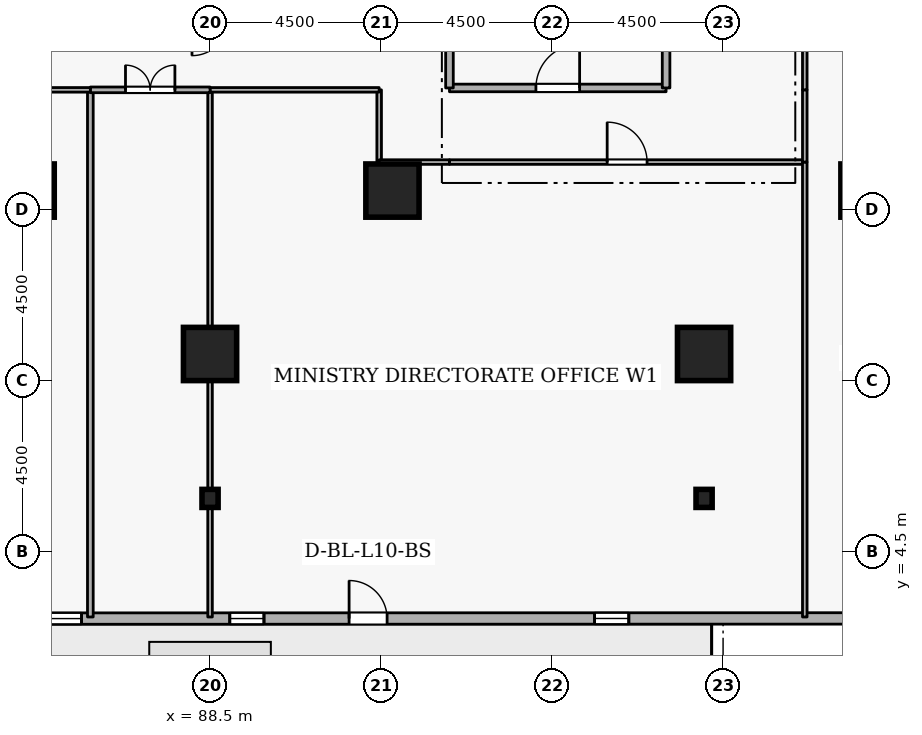
"""IFC4 building model, lengths in metres.
Left out: names, types, materials, properties, quantities, classifications, styles, units other than length and angle.
Written with IfcOpenShell. Run it as: python <this file> out.ifc"""

import sys

from ifc_helpers import new_model, si_unit, direction, frame, frame_2d, origin, origin_2d, place, context, subcontext, project, spatial, rectangle, i_section, extrude, element, fill, save


model = new_model("IFC4")
c1 = context("Model", 3, precision=1e-05, world=origin(), true_north=direction((0.0, 1.0)))
c2 = subcontext(c1, "Body", "Model", "MODEL_VIEW")
j1 = project(units=[si_unit("LENGTHUNIT", "METRE"), si_unit("PLANEANGLEUNIT", "RADIAN")], contexts=[c1])
p1 = place(None, origin())
s1 = spatial("IfcSite", under=j1, at=p1, CompositionType="ELEMENT")
p2 = place(p1, origin())
s2 = spatial("IfcBuilding", under=s1, at=p2, CompositionType="ELEMENT")
p3 = place(p2, frame((0.0, 0.0, 42.3)))
s3 = spatial("IfcBuildingStorey", under=s2, at=p3, CompositionType="ELEMENT", Elevation=42.3)
for number, where, z_axis, x_axis in (
    (1, (105.8, 14.0, 0.0), (0.0, 0.0, 1.0), (1.0, 0.0, 0.0)),
    (2, (101.5, 9.7, 0.0), (0.0, 0.0, 1.0), (1.0, 0.0, 0.0)),
    (3, (88.5, 9.7, 0.0), (0.0, 0.0, 1.0), (1.0, 0.0, 0.0)),
    (4, (93.3, 14.0, 0.0), (0.0, 0.0, 1.0), (1.0, 0.0, 0.0)),
    (5, (83.7, 14.0, 0.0), (0.0, 0.0, 1.0), (1.0, 0.0, 0.0)),
):
    element("IfcColumn", number, at=place(p3, frame(where, z_axis=z_axis, x_axis=x_axis)), inside=s3, PredefinedType="COLUMN", context=c2, shape_type="SweptSolid", body=[
        extrude(rectangle(XDim=1.4, YDim=1.4, at=origin_2d()), origin(), (0.0, 0.0, 1.0), 3.6),
    ])
for number, where, z_axis, x_axis in (
    (6, (101.5, 5.9, 0.0), (0.0, 0.0, 1.0), (1.0, 0.0, 0.0)),
    (7, (88.5, 5.9, 0.0), (0.0, 0.0, 1.0), (1.0, 0.0, 0.0)),
):
    element("IfcColumn", number, at=place(p3, frame(where, z_axis=z_axis, x_axis=x_axis)), inside=s3, PredefinedType="COLUMN", context=c2, shape_type="SweptSolid", body=[
        extrude(i_section(OverallWidth=0.424, OverallDepth=0.475, WebThickness=0.048, FlangeThickness=0.077, FilletRadius=0.015, at=origin_2d()), origin(), (0.0, 0.0, 1.0), 3.6),
    ])
p4 = place(p3, frame((72.819, 2.735, 0.0), z_axis=(0.0, 0.0, 1.0), x_axis=(0.999999978205, 0.000208784245, 0.0)))
e8 = element("IfcWall", 8, at=p4, inside=s3, PredefinedType="STANDARD", context=c2, shape_type="SweptSolid", body=[
    extrude(rectangle(XDim=35.08, YDim=0.3, at=frame_2d((17.54, 0.0))), origin(), (0.0, 0.0, 1.0), 2.7),
])
p5 = place(p4, frame((19.34, 0.0, 0.0)))
e9 = element("IfcOpeningElement", 9, at=p5, cuts=e8, PredefinedType="OPENING", context=c2, shape_type="SweptSolid", body=[
    extrude(rectangle(XDim=1.0, YDim=2.08, at=frame_2d((0.5, 1.04))), frame((0.0, 0.16, 0.0), z_axis=(0.0, -1.0, 0.0), x_axis=(1.0, 0.0, 0.0)), (0.0, 0.0, 1.0), 0.32),
])
p6 = place(p4, frame((1.8, 0.0, 0.72)))
e10 = element("IfcOpeningElement", 10, at=p6, cuts=e8, PredefinedType="OPENING", context=c2, shape_type="SweptSolid", body=[
    extrude(rectangle(XDim=0.9, YDim=1.75, at=frame_2d((0.45, 0.875))), frame((0.0, 0.16, 0.0), z_axis=(0.0, -1.0, 0.0), x_axis=(1.0, 0.0, 0.0)), (0.0, 0.0, 1.0), 0.32),
])
p7 = place(p4, frame((6.6, 0.0, 0.72)))
e11 = element("IfcOpeningElement", 11, at=p7, cuts=e8, PredefinedType="OPENING", context=c2, shape_type="SweptSolid", body=[
    extrude(rectangle(XDim=0.9, YDim=1.75, at=frame_2d((0.45, 0.875))), frame((0.0, 0.16, 0.0), z_axis=(0.0, -1.0, 0.0), x_axis=(1.0, 0.0, 0.0)), (0.0, 0.0, 1.0), 0.32),
])
p8 = place(p4, frame((11.4, 0.0, 0.72)))
e12 = element("IfcOpeningElement", 12, at=p8, cuts=e8, PredefinedType="OPENING", context=c2, shape_type="SweptSolid", body=[
    extrude(rectangle(XDim=0.9, YDim=1.75, at=frame_2d((0.45, 0.875))), frame((0.0, 0.16, 0.0), z_axis=(0.0, -1.0, 0.0), x_axis=(1.0, 0.0, 0.0)), (0.0, 0.0, 1.0), 0.32),
])
p9 = place(p4, frame((16.2, 0.0, 0.72)))
e13 = element("IfcOpeningElement", 13, at=p9, cuts=e8, PredefinedType="OPENING", context=c2, shape_type="SweptSolid", body=[
    extrude(rectangle(XDim=0.9, YDim=1.75, at=frame_2d((0.45, 0.875))), frame((0.0, 0.16, 0.0), z_axis=(0.0, -1.0, 0.0), x_axis=(1.0, 0.0, 0.0)), (0.0, 0.0, 1.0), 0.32),
])
p10 = place(p4, frame((25.8, 0.0, 0.72)))
e14 = element("IfcOpeningElement", 14, at=p10, cuts=e8, PredefinedType="OPENING", context=c2, shape_type="SweptSolid", body=[
    extrude(rectangle(XDim=0.9, YDim=1.75, at=frame_2d((0.45, 0.875))), frame((0.0, 0.16, 0.0), z_axis=(0.0, -1.0, 0.0), x_axis=(1.0, 0.0, 0.0)), (0.0, 0.0, 1.0), 0.32),
])
p11 = place(p3, frame((94.8, 16.7, 0.0), z_axis=(0.0, 0.0, 1.0), x_axis=(1.0, 0.0, 0.0)))
e15 = element("IfcWall", 15, at=p11, inside=s3, PredefinedType="STANDARD", context=c2, shape_type="SweptSolid", body=[
    extrude(rectangle(XDim=5.7, YDim=0.2, at=frame_2d((2.85, 0.0))), origin(), (0.0, 0.0, 1.0), 3.34),
])
p12 = place(p11, frame((2.275, 0.0, 0.0)))
e16 = element("IfcOpeningElement", 16, at=p12, cuts=e15, PredefinedType="OPENING", context=c2, shape_type="SweptSolid", body=[
    extrude(rectangle(XDim=1.15, YDim=2.1, at=frame_2d((0.575, 1.05))), frame((0.0, 0.11, 0.0), z_axis=(0.0, -1.0, 0.0), x_axis=(1.0, 0.0, 0.0)), (0.0, 0.0, 1.0), 0.22),
])
for number, where, z_axis, x_axis in (
    (17, (100.5, 16.7, 0.0), (0.0, 0.0, 1.0), (0.0, 1.0, 0.0)),
    (18, (94.8, 19.2, 0.0), (0.0, 0.0, 1.0), (0.0, -1.0, 0.0)),
):
    element("IfcWall", number, at=place(p3, frame(where, z_axis=z_axis, x_axis=x_axis)), inside=s3, PredefinedType="STANDARD", context=c2, shape_type="SweptSolid", body=[
        extrude(rectangle(XDim=2.5, YDim=0.2, at=frame_2d((1.25, 0.0))), origin(), (0.0, 0.0, 1.0), 3.34),
    ])
p13 = place(p3, frame((92.95, 16.65, 0.0), z_axis=(0.0, 0.0, 1.0), x_axis=(0.0, -1.0, 0.0)))
e19 = element("IfcWall", 19, at=p13, inside=s3, PredefinedType="PARTITIONING", context=c2, shape_type="SweptSolid", body=[
    extrude(rectangle(XDim=1.9, YDim=0.12, at=frame_2d((0.95, 0.0))), origin(), (0.0, 0.0, 1.0), 3.34),
])
p14 = place(p3, frame((92.95, 14.75, 0.0), z_axis=(0.0, 0.0, 1.0), x_axis=(1.0, 0.0, 0.0)))
e20 = element("IfcWall", 20, at=p14, inside=s3, PredefinedType="PARTITIONING", context=c2, shape_type="SweptSolid", body=[
    extrude(rectangle(XDim=1.85, YDim=0.12, at=frame_2d((0.925, 0.0))), origin(), (0.0, 0.0, 1.0), 3.34),
])
p15 = place(p3, frame((94.8, 14.75, 0.0), z_axis=(0.0, 0.0, 1.0), x_axis=(1.0, 0.0, 0.0)))
e21 = element("IfcWall", 21, at=p15, inside=s3, PredefinedType="PARTITIONING", context=c2, shape_type="SweptSolid", body=[
    extrude(rectangle(XDim=9.35, YDim=0.12, at=frame_2d((4.675, 0.0))), origin(), (0.0, 0.0, 1.0), 3.34),
])
p16 = place(p15, frame((4.15, 0.0, 0.0)))
e22 = element("IfcOpeningElement", 22, at=p16, cuts=e21, PredefinedType="OPENING", context=c2, shape_type="SweptSolid", body=[
    extrude(rectangle(XDim=1.05, YDim=2.1, at=frame_2d((0.525, 1.05))), frame((0.0, 0.07, 0.0), z_axis=(0.0, -1.0, 0.0), x_axis=(1.0, 0.0, 0.0)), (0.0, 0.0, 1.0), 0.14),
])
p17 = place(p3, frame((104.15, 14.75, 0.0), z_axis=(0.0, 0.0, 1.0), x_axis=(0.0, -1.0, 0.0)))
e23 = element("IfcWall", 23, at=p17, inside=s3, PredefinedType="PARTITIONING", context=c2, shape_type="SweptSolid", body=[
    extrude(rectangle(XDim=11.97, YDim=0.12, at=frame_2d((5.985, 0.0))), origin(), (0.0, 0.0, 1.0), 3.34),
])
p18 = place(p3, frame((88.5, 2.78, 0.0), z_axis=(0.0, 0.0, 1.0), x_axis=(0.0, 1.0, 0.0)))
e24 = element("IfcWall", 24, at=p18, inside=s3, PredefinedType="PARTITIONING", context=c2, shape_type="SweptSolid", body=[
    extrude(rectangle(XDim=13.87, YDim=0.12, at=frame_2d((6.935, 0.0))), origin(), (0.0, 0.0, 1.0), 2.882),
])
p19 = place(p3, frame((88.5, 16.65, 0.0), z_axis=(0.0, 0.0, 1.0), x_axis=(1.0, 0.0, 0.0)))
e25 = element("IfcWall", 25, at=p19, inside=s3, PredefinedType="PARTITIONING", context=c2, shape_type="SweptSolid", body=[
    extrude(rectangle(XDim=4.45, YDim=0.12, at=frame_2d((2.225, 0.0))), origin(), (0.0, 0.0, 1.0), 3.34),
])
p20 = place(p3, frame((85.35, 2.78, 0.0), z_axis=(0.0, 0.0, 1.0), x_axis=(0.0, 1.0, 0.0)))
e26 = element("IfcWall", 26, at=p20, inside=s3, PredefinedType="PARTITIONING", context=c2, shape_type="SweptSolid", body=[
    extrude(rectangle(XDim=13.87, YDim=0.15, at=frame_2d((6.935, 0.0))), origin(), (0.0, 0.0, 1.0), 3.34),
])
p21 = place(p3, frame((85.35, 16.65, 0.0), z_axis=(0.0, 0.0, 1.0), x_axis=(1.0, 0.0, 0.0)))
e27 = element("IfcWall", 27, at=p21, inside=s3, PredefinedType="PARTITIONING", context=c2, shape_type="SweptSolid", body=[
    extrude(rectangle(XDim=3.15, YDim=0.15, at=frame_2d((1.575, 0.0))), origin(), (0.0, 0.0, 1.0), 3.34),
])
p22 = place(p21, frame((0.925, 0.0, 0.0)))
e28 = element("IfcOpeningElement", 28, at=p22, cuts=e27, PredefinedType="OPENING", context=c2, shape_type="SweptSolid", body=[
    extrude(rectangle(XDim=1.3, YDim=2.12, at=frame_2d((0.65, 1.06))), frame((0.0, 0.085, 0.0), z_axis=(0.0, -1.0, 0.0), x_axis=(1.0, 0.0, 0.0)), (0.0, 0.0, 1.0), 0.17),
])
p23 = place(p3, frame((84.05, 16.65, 0.0), z_axis=(0.0, 0.0, 1.0), x_axis=(1.0, 0.0, 0.0)))
e29 = element("IfcWall", 29, at=p23, inside=s3, PredefinedType="PARTITIONING", context=c2, shape_type="SweptSolid", body=[
    extrude(rectangle(XDim=1.3, YDim=0.12, at=frame_2d((0.65, 0.0))), origin(), (0.0, 0.0, 1.0), 3.34),
])
p24 = place(p3, frame((104.15, 14.75, 0.0), z_axis=(0.0, 0.0, 1.0), x_axis=(0.0, 1.0, 0.0)))
e30 = element("IfcWall", 30, at=p24, inside=s3, PredefinedType="PARTITIONING", context=c2, shape_type="SweptSolid", body=[
    extrude(rectangle(XDim=1.9, YDim=0.12, at=frame_2d((0.95, 0.0))), origin(), (0.0, 0.0, 1.0), 3.34),
])
p25 = place(p3, frame((104.15, 16.65, 0.0), z_axis=(0.0, 0.0, 1.0), x_axis=(0.0, 1.0, 0.0)))
e31 = element("IfcWall", 31, at=p25, inside=s3, PredefinedType="PARTITIONING", context=c2, shape_type="SweptSolid", body=[
    extrude(rectangle(XDim=4.85, YDim=0.12, at=frame_2d((2.425, 0.0))), origin(), (0.0, 0.0, 1.0), 3.34),
])
p26 = place(p25, frame((1.9, 0.0, 0.0)))
e32 = element("IfcOpeningElement", 32, at=p26, cuts=e31, PredefinedType="OPENING", context=c2, shape_type="SweptSolid", body=[
    extrude(rectangle(XDim=1.05, YDim=2.1, at=frame_2d((0.525, 1.05))), frame((0.0, 0.07, 0.0), z_axis=(0.0, -1.0, 0.0), x_axis=(1.0, 0.0, 0.0)), (0.0, 0.0, 1.0), 0.14),
])
p27 = place(p5, origin())
e33 = element("IfcDoor", 33, at=p27, inside=s3, OperationType="SINGLE_SWING_LEFT", PredefinedType="DOOR", context=c2, shape_type="SweptSolid", body=[
    extrude(rectangle(XDim=1.0, YDim=2.08, at=frame_2d((0.5, 1.04))), frame((0.0, 0.025, 0.0), z_axis=(0.0, -1.0, 0.0), x_axis=(1.0, 0.0, 0.0)), (0.0, 0.0, 1.0), 0.05),
])
fill(e9, e33)
p28 = place(p8, origin())
e34 = element("IfcWindow", 34, at=p28, inside=s3, PartitioningType="SINGLE_PANEL", PredefinedType="WINDOW", context=c2, shape_type="SweptSolid", body=[
    extrude(rectangle(XDim=0.9, YDim=1.75, at=frame_2d((0.45, 0.875))), frame((0.0, 0.03, 0.0), z_axis=(0.0, -1.0, 0.0), x_axis=(1.0, 0.0, 0.0)), (0.0, 0.0, 1.0), 0.06),
])
fill(e12, e34)
p29 = place(p9, origin())
e35 = element("IfcWindow", 35, at=p29, inside=s3, PartitioningType="SINGLE_PANEL", PredefinedType="WINDOW", context=c2, shape_type="SweptSolid", body=[
    extrude(rectangle(XDim=0.9, YDim=1.75, at=frame_2d((0.45, 0.875))), frame((0.0, 0.03, 0.0), z_axis=(0.0, -1.0, 0.0), x_axis=(1.0, 0.0, 0.0)), (0.0, 0.0, 1.0), 0.06),
])
fill(e13, e35)
p30 = place(p10, origin())
e36 = element("IfcWindow", 36, at=p30, inside=s3, PartitioningType="SINGLE_PANEL", PredefinedType="WINDOW", context=c2, shape_type="SweptSolid", body=[
    extrude(rectangle(XDim=0.9, YDim=1.75, at=frame_2d((0.45, 0.875))), frame((0.0, 0.03, 0.0), z_axis=(0.0, -1.0, 0.0), x_axis=(1.0, 0.0, 0.0)), (0.0, 0.0, 1.0), 0.06),
])
fill(e14, e36)
p31 = place(p12, origin())
e37 = element("IfcDoor", 37, at=p31, inside=s3, OperationType="SINGLE_SWING_RIGHT", PredefinedType="DOOR", context=c2, shape_type="SweptSolid", body=[
    extrude(rectangle(XDim=1.15, YDim=2.1, at=frame_2d((0.575, 1.05))), frame((0.0, 0.025, 0.0), z_axis=(0.0, -1.0, 0.0), x_axis=(1.0, 0.0, 0.0)), (0.0, 0.0, 1.0), 0.05),
])
fill(e16, e37)
p32 = place(p16, origin())
e38 = element("IfcDoor", 38, at=p32, inside=s3, OperationType="SINGLE_SWING_LEFT", PredefinedType="DOOR", context=c2, shape_type="SweptSolid", body=[
    extrude(rectangle(XDim=1.05, YDim=2.1, at=frame_2d((0.525, 1.05))), frame((0.0, 0.025, 0.0), z_axis=(0.0, -1.0, 0.0), x_axis=(1.0, 0.0, 0.0)), (0.0, 0.0, 1.0), 0.05),
])
fill(e22, e38)
p33 = place(p22, origin())
e39 = element("IfcDoor", 39, at=p33, inside=s3, OperationType="DOUBLE_DOOR_SINGLE_SWING", PredefinedType="DOOR", context=c2, shape_type="SweptSolid", body=[
    extrude(rectangle(XDim=1.3, YDim=2.12, at=frame_2d((0.65, 1.06))), frame((0.0, 0.025, 0.0), z_axis=(0.0, -1.0, 0.0), x_axis=(1.0, 0.0, 0.0)), (0.0, 0.0, 1.0), 0.05),
])
fill(e28, e39)
save(model, sys.argv[1])
